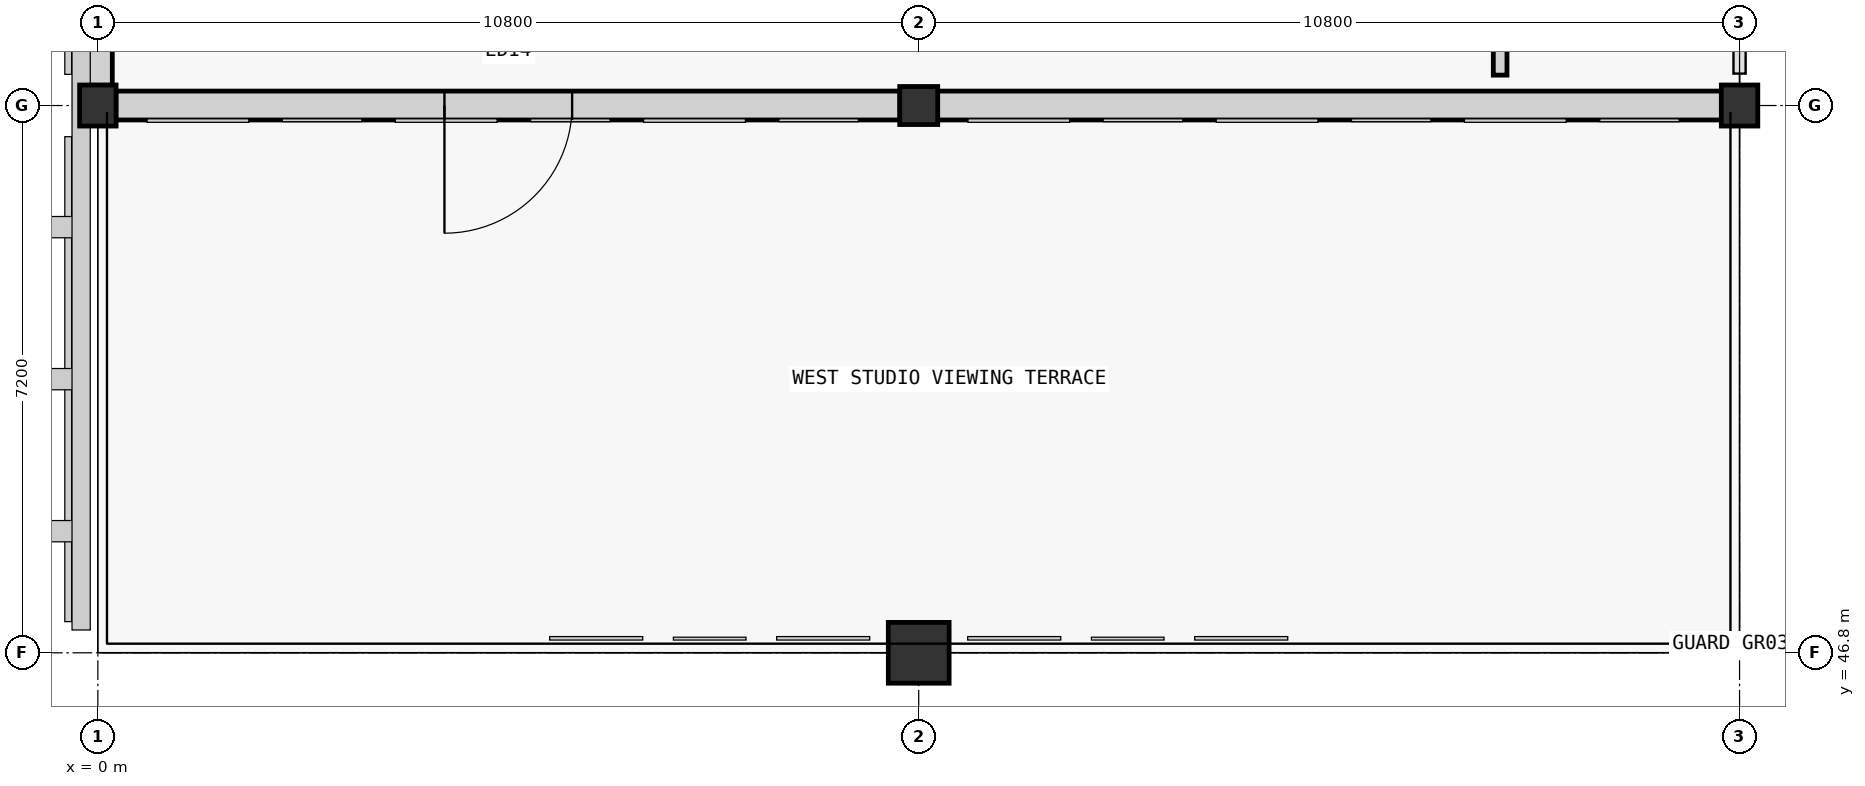
"""IFC4 building model, lengths in metres.
Left out: names, types, materials, properties, quantities, classifications, styles, units other than length and angle.
Written with IfcOpenShell. Run it as: python <this file> out.ifc"""

import sys

from ifc_helpers import new_model, si_unit, direction, frame, frame_2d, origin, origin_2d, place, context, subcontext, project, spatial, rectangle, extrude, element, fill, save


model = new_model("IFC4")
c1 = context("Model", 3, precision=1e-05, world=origin(), true_north=direction((0.0, 1.0)))
c2 = subcontext(c1, "Body", "Model", "MODEL_VIEW")
j1 = project(units=[si_unit("LENGTHUNIT", "METRE"), si_unit("PLANEANGLEUNIT", "RADIAN")], contexts=[c1])
p1 = place(None, origin())
s1 = spatial("IfcSite", under=j1, at=p1, CompositionType="ELEMENT")
p2 = place(p1, origin())
s2 = spatial("IfcBuilding", under=s1, at=p2, CompositionType="ELEMENT")
p3 = place(p2, frame((0.0, 0.0, 15.0)))
s3 = spatial("IfcBuildingStorey", under=s2, at=p3, CompositionType="ELEMENT", Elevation=15.0)
p4 = place(p3, frame((0.0, 54.0, 0.0), z_axis=(0.0, 0.0, 1.0), x_axis=(1.0, 0.0, 0.0)))
e1 = element("IfcColumn", 1, at=p4, inside=s3, PredefinedType="COLUMN", context=c2, shape_type="SweptSolid", body=[
    extrude(rectangle(XDim=0.48, YDim=0.54, at=origin_2d()), origin(), (0.0, 0.0, 1.0), 4.2),
])
p5 = place(p3, frame((10.8, 46.8, 0.0), z_axis=(0.0, 0.0, 1.0), x_axis=(1.0, 0.0, 0.0)))
e2 = element("IfcColumn", 2, at=p5, inside=s3, PredefinedType="COLUMN", context=c2, shape_type="SweptSolid", body=[
    extrude(rectangle(XDim=0.8, YDim=0.8, at=origin_2d()), origin(), (0.0, 0.0, 1.0), 0.385),
])
p6 = place(p3, frame((10.8, 54.0, 0.0), z_axis=(0.0, 0.0, 1.0), x_axis=(1.0, 0.0, 0.0)))
e3 = element("IfcColumn", 3, at=p6, inside=s3, PredefinedType="COLUMN", context=c2, shape_type="SweptSolid", body=[
    extrude(rectangle(XDim=0.5, YDim=0.5, at=origin_2d()), origin(), (0.0, 0.0, 1.0), 4.2),
])
p7 = place(p3, frame((21.6, 54.0, 0.0), z_axis=(0.0, 0.0, 1.0), x_axis=(1.0, 0.0, 0.0)))
e4 = element("IfcColumn", 4, at=p7, inside=s3, PredefinedType="COLUMN", context=c2, shape_type="SweptSolid", body=[
    extrude(rectangle(XDim=0.48, YDim=0.54, at=origin_2d()), origin(), (0.0, 0.0, 1.0), 4.2),
])
p8 = place(p3, frame((0.0, 54.266, 0.0), z_axis=(0.0, 0.0, 1.0), x_axis=(0.0, 1.0, 0.0)))
e5 = element("IfcWall", 5, at=p8, inside=s3, PredefinedType="STANDARD", context=c2, shape_type="SweptSolid", body=[
    extrude(rectangle(XDim=6.668, YDim=0.38, at=frame_2d((3.334, 0.0))), origin(), (0.0, 0.0, 1.0), 3.26),
])
p9 = place(p8, frame((1.809, 0.0, 0.9)))
e6 = element("IfcOpeningElement", 6, at=p9, cuts=e5, PredefinedType="OPENING", context=c2, shape_type="SweptSolid", body=[
    extrude(rectangle(XDim=3.05, YDim=1.62, at=frame_2d((1.525, 0.81))), frame((0.0, 0.19, 0.0), z_axis=(0.0, -1.0, 0.0), x_axis=(1.0, 0.0, 0.0)), (0.0, 0.0, 1.0), 0.38),
])
p10 = place(p3, frame((10.554, 54.0, 0.0), z_axis=(0.0, 0.0, 1.0), x_axis=(-1.0, 0.0, 0.0)))
e7 = element("IfcWall", 7, at=p10, inside=s3, PredefinedType="STANDARD", context=c2, shape_type="SweptSolid", body=[
    extrude(rectangle(XDim=10.318, YDim=0.38, at=frame_2d((5.159, 0.0))), origin(), (0.0, 0.0, 1.0), 3.17),
])
p11 = place(p10, frame((4.314, 0.0, 0.0)))
e8 = element("IfcOpeningElement", 8, at=p11, cuts=e7, PredefinedType="OPENING", context=c2, shape_type="SweptSolid", body=[
    extrude(rectangle(XDim=1.68, YDim=2.24, at=frame_2d((0.84, 1.12))), frame((0.0, 0.19, 0.0), z_axis=(0.0, -1.0, 0.0), x_axis=(1.0, 0.0, 0.0)), (0.0, 0.0, 1.0), 0.38),
])
p12 = place(p3, frame((21.364, 54.0, 0.0), z_axis=(0.0, 0.0, 1.0), x_axis=(-1.0, 0.0, 0.0)))
e9 = element("IfcWall", 9, at=p12, inside=s3, PredefinedType="STANDARD", context=c2, shape_type="SweptSolid", body=[
    extrude(rectangle(XDim=10.318, YDim=0.38, at=frame_2d((5.159, 0.0))), origin(), (0.0, 0.0, 1.0), 3.17),
])
p13 = place(p3, frame((18.45, 54.4, 0.0), z_axis=(0.0, 0.0, 1.0), x_axis=(0.0, 1.0, 0.0)))
e10 = element("IfcWall", 10, at=p13, inside=s3, PredefinedType="STANDARD", context=c2, shape_type="SweptSolid", body=[
    extrude(rectangle(XDim=13.6, YDim=0.18, at=frame_2d((6.8, 0.0))), origin(), (0.0, 0.0, 1.0), 3.06),
])
p14 = place(p13, frame((6.02, 0.0, 0.0)))
e11 = element("IfcOpeningElement", 11, at=p14, cuts=e10, PredefinedType="OPENING", context=c2, shape_type="SweptSolid", body=[
    extrude(rectangle(XDim=1.56, YDim=2.25, at=frame_2d((0.78, 1.125))), frame((0.0, 0.09, 0.0), z_axis=(0.0, -1.0, 0.0), x_axis=(1.0, 0.0, 0.0)), (0.0, 0.0, 1.0), 0.18),
])
p15 = place(p11, origin())
e12 = element("IfcDoor", 12, at=p15, inside=s3, OperationType="SINGLE_SWING_RIGHT", PredefinedType="DOOR", context=c2, shape_type="SweptSolid", body=[
    extrude(rectangle(XDim=1.68, YDim=2.24, at=frame_2d((0.84, 1.12))), frame((0.0, 0.025, 0.0), z_axis=(0.0, -1.0, 0.0), x_axis=(1.0, 0.0, 0.0)), (0.0, 0.0, 1.0), 0.05),
])
fill(e8, e12)
save(model, sys.argv[1])
